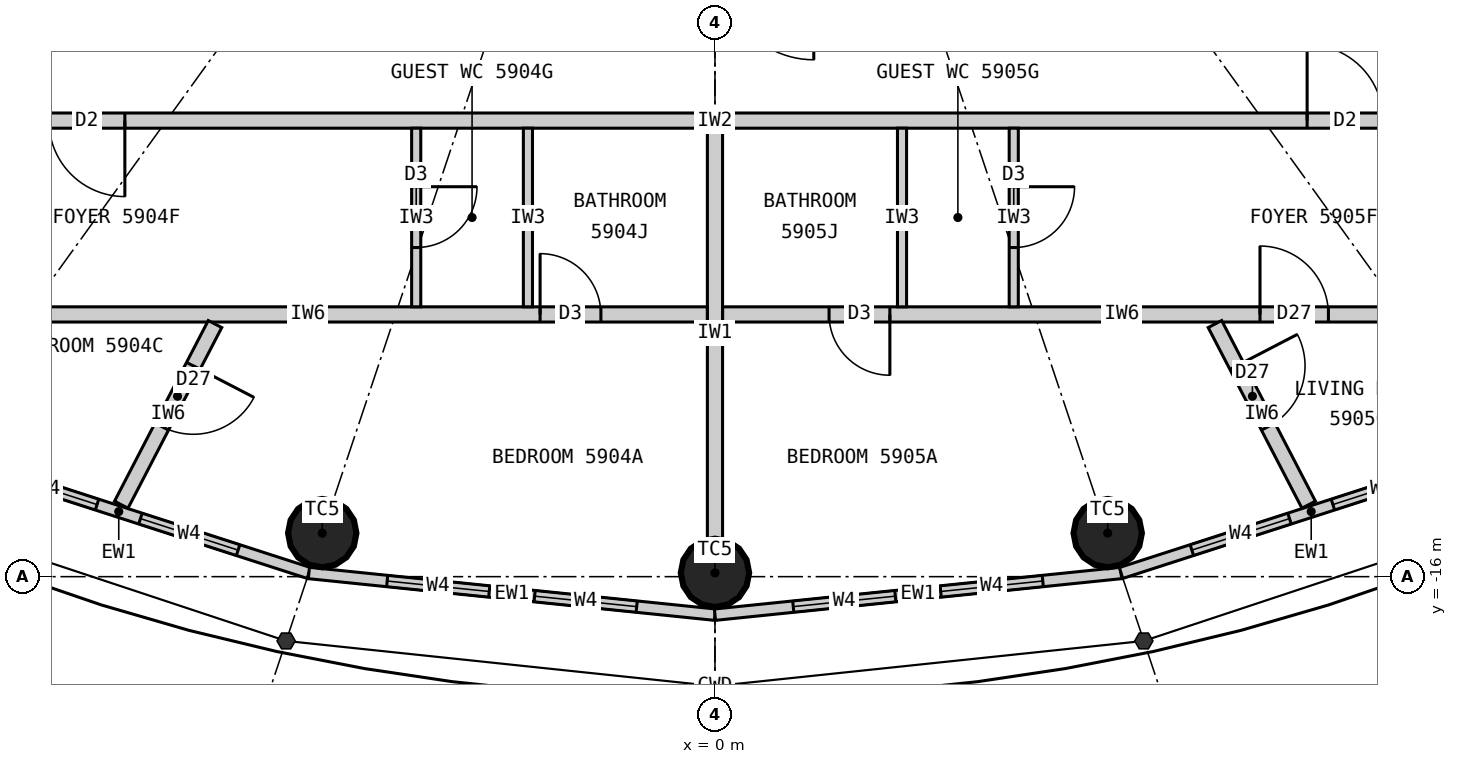
"""IFC4 building model, lengths in metres.
Left out: names, types, materials, properties, quantities, classifications, styles, units other than length and angle.
Written with IfcOpenShell. Run it as: python <this file> out.ifc"""

import sys

from ifc_helpers import new_model, si_unit, direction, frame, frame_2d, origin, origin_2d, place, context, subcontext, project, spatial, rectangle, circle, extrude, element, fill, save


model = new_model("IFC4")
c1 = context("Model", 3, precision=1e-05, world=origin(), true_north=direction((0.0, 1.0)))
c2 = subcontext(c1, "Body", "Model", "MODEL_VIEW")
j1 = project(units=[si_unit("LENGTHUNIT", "METRE"), si_unit("PLANEANGLEUNIT", "RADIAN")], contexts=[c1])
p1 = place(None, origin())
s1 = spatial("IfcSite", under=j1, at=p1, CompositionType="ELEMENT")
p2 = place(p1, origin())
s2 = spatial("IfcBuilding", under=s1, at=p2, CompositionType="ELEMENT")
p3 = place(p2, frame((0.0, 0.0, 219.3)))
s3 = spatial("IfcBuildingStorey", under=s2, at=p3, CompositionType="ELEMENT", Elevation=219.3)
for number, where, z_axis, x_axis in (
    (1, (-5.167, -15.427, 0.0), (0.0, 0.0, 1.0), (1.0, 0.0, 0.0)),
    (2, (0.0, -15.95, 0.0), (0.0, 0.0, 1.0), (1.0, 0.0, 0.0)),
    (3, (5.167, -15.427, 0.0), (0.0, 0.0, 1.0), (1.0, 0.0, 0.0)),
):
    element("IfcColumn", number, at=place(p3, frame(where, z_axis=z_axis, x_axis=x_axis)), inside=s3, PredefinedType="COLUMN", context=c2, shape_type="SweptSolid", body=[
        extrude(circle(Radius=0.45, at=origin_2d()), origin(), (0.0, 0.0, 1.0), 3.3),
    ])
p4 = place(p3, frame((-10.346, -14.336, 0.0), z_axis=(0.0, 0.0, 1.0), x_axis=(0.951644702515, -0.307200846638, 0.0)))
e4 = element("IfcWall", 4, at=p4, inside=s3, PredefinedType="ELEMENTEDWALL", context=c2, shape_type="SweptSolid", body=[
    extrude(rectangle(XDim=5.258, YDim=0.15, at=frame_2d((2.629, 0.0))), origin(), (0.0, 0.0, 1.0), 3.12),
])
p5 = place(p4, frame((0.979, 0.0, 0.9)))
e5 = element("IfcOpeningElement", 5, at=p5, cuts=e4, PredefinedType="OPENING", context=c2, shape_type="SweptSolid", body=[
    extrude(rectangle(XDim=1.35, YDim=1.9, at=frame_2d((0.675, 0.95))), frame((0.0, 0.085, 0.0), z_axis=(0.0, -1.0, 0.0), x_axis=(1.0, 0.0, 0.0)), (0.0, 0.0, 1.0), 0.17),
])
p6 = place(p4, frame((2.929, 0.0, 0.9)))
e6 = element("IfcOpeningElement", 6, at=p6, cuts=e4, PredefinedType="OPENING", context=c2, shape_type="SweptSolid", body=[
    extrude(rectangle(XDim=1.35, YDim=1.9, at=frame_2d((0.675, 0.95))), frame((0.0, 0.085, 0.0), z_axis=(0.0, -1.0, 0.0), x_axis=(1.0, 0.0, 0.0)), (0.0, 0.0, 1.0), 0.17),
])
p7 = place(p3, frame((-5.343, -15.952, 0.0), z_axis=(0.0, 0.0, 1.0), x_axis=(0.994774574972, -0.102095763818, 0.0)))
e7 = element("IfcWall", 7, at=p7, inside=s3, PredefinedType="ELEMENTEDWALL", context=c2, shape_type="SweptSolid", body=[
    extrude(rectangle(XDim=5.371, YDim=0.15, at=frame_2d((2.686, 0.0))), origin(), (0.0, 0.0, 1.0), 3.12),
])
p8 = place(p7, frame((1.035, 0.0, 0.9)))
e8 = element("IfcOpeningElement", 8, at=p8, cuts=e7, PredefinedType="OPENING", context=c2, shape_type="SweptSolid", body=[
    extrude(rectangle(XDim=1.35, YDim=1.9, at=frame_2d((0.675, 0.95))), frame((0.0, 0.085, 0.0), z_axis=(0.0, -1.0, 0.0), x_axis=(1.0, 0.0, 0.0)), (0.0, 0.0, 1.0), 0.17),
])
p9 = place(p7, frame((2.985, 0.0, 0.9)))
e9 = element("IfcOpeningElement", 9, at=p9, cuts=e7, PredefinedType="OPENING", context=c2, shape_type="SweptSolid", body=[
    extrude(rectangle(XDim=1.35, YDim=1.9, at=frame_2d((0.675, 0.95))), frame((0.0, 0.085, 0.0), z_axis=(0.0, -1.0, 0.0), x_axis=(1.0, 0.0, 0.0)), (0.0, 0.0, 1.0), 0.17),
])
p10 = place(p3, frame((0.0, -16.5, 0.0), z_axis=(0.0, 0.0, 1.0), x_axis=(0.994774574972, 0.102095763818, 0.0)))
e10 = element("IfcWall", 10, at=p10, inside=s3, PredefinedType="ELEMENTEDWALL", context=c2, shape_type="SweptSolid", body=[
    extrude(rectangle(XDim=5.371, YDim=0.15, at=frame_2d((2.686, 0.0))), origin(), (0.0, 0.0, 1.0), 3.12),
])
p11 = place(p10, frame((1.035, 0.0, 0.9)))
e11 = element("IfcOpeningElement", 11, at=p11, cuts=e10, PredefinedType="OPENING", context=c2, shape_type="SweptSolid", body=[
    extrude(rectangle(XDim=1.35, YDim=1.9, at=frame_2d((0.675, 0.95))), frame((0.0, 0.085, 0.0), z_axis=(0.0, -1.0, 0.0), x_axis=(1.0, 0.0, 0.0)), (0.0, 0.0, 1.0), 0.17),
])
p12 = place(p10, frame((2.985, 0.0, 0.9)))
e12 = element("IfcOpeningElement", 12, at=p12, cuts=e10, PredefinedType="OPENING", context=c2, shape_type="SweptSolid", body=[
    extrude(rectangle(XDim=1.35, YDim=1.9, at=frame_2d((0.675, 0.95))), frame((0.0, 0.085, 0.0), z_axis=(0.0, -1.0, 0.0), x_axis=(1.0, 0.0, 0.0)), (0.0, 0.0, 1.0), 0.17),
])
p13 = place(p3, frame((5.343, -15.952, 0.0), z_axis=(0.0, 0.0, 1.0), x_axis=(0.951644702515, 0.307200846638, 0.0)))
e13 = element("IfcWall", 13, at=p13, inside=s3, PredefinedType="ELEMENTEDWALL", context=c2, shape_type="SweptSolid", body=[
    extrude(rectangle(XDim=5.258, YDim=0.15, at=frame_2d((2.629, 0.0))), origin(), (0.0, 0.0, 1.0), 3.12),
])
p14 = place(p13, frame((0.979, 0.0, 0.9)))
e14 = element("IfcOpeningElement", 14, at=p14, cuts=e13, PredefinedType="OPENING", context=c2, shape_type="SweptSolid", body=[
    extrude(rectangle(XDim=1.35, YDim=1.9, at=frame_2d((0.675, 0.95))), frame((0.0, 0.085, 0.0), z_axis=(0.0, -1.0, 0.0), x_axis=(1.0, 0.0, 0.0)), (0.0, 0.0, 1.0), 0.17),
])
p15 = place(p13, frame((2.929, 0.0, 0.9)))
e15 = element("IfcOpeningElement", 15, at=p15, cuts=e13, PredefinedType="OPENING", context=c2, shape_type="SweptSolid", body=[
    extrude(rectangle(XDim=1.35, YDim=1.9, at=frame_2d((0.675, 0.95))), frame((0.0, 0.085, 0.0), z_axis=(0.0, -1.0, 0.0), x_axis=(1.0, 0.0, 0.0)), (0.0, 0.0, 1.0), 0.17),
])
p16 = place(p3, frame((11.1, -10.0, 0.0), z_axis=(0.0, 0.0, 1.0), x_axis=(-1.0, 0.0, 0.0)))
e16 = element("IfcWall", 16, at=p16, inside=s3, PredefinedType="PARTITIONING", context=c2, shape_type="SweptSolid", body=[
    extrude(rectangle(XDim=22.2, YDim=0.2, at=frame_2d((11.1, 0.0))), origin(), (0.0, 0.0, 1.0), 3.12),
])
p17 = place(p16, frame((18.864, 0.0, 0.0)))
e17 = element("IfcOpeningElement", 17, at=p17, cuts=e16, PredefinedType="OPENING", context=c2, shape_type="SweptSolid", body=[
    extrude(rectangle(XDim=1.0, YDim=2.2, at=frame_2d((0.5, 1.1))), frame((0.0, 0.11, 0.0), z_axis=(0.0, -1.0, 0.0), x_axis=(1.0, 0.0, 0.0)), (0.0, 0.0, 1.0), 0.22),
])
p18 = place(p16, frame((2.309, 0.0, 0.0)))
e18 = element("IfcOpeningElement", 18, at=p18, cuts=e16, PredefinedType="OPENING", context=c2, shape_type="SweptSolid", body=[
    extrude(rectangle(XDim=1.0, YDim=2.2, at=frame_2d((0.5, 1.1))), frame((0.0, 0.11, 0.0), z_axis=(0.0, -1.0, 0.0), x_axis=(1.0, 0.0, 0.0)), (0.0, 0.0, 1.0), 0.22),
])
p19 = place(p3, frame((0.0, -10.1, 0.0), z_axis=(0.0, 0.0, 1.0), x_axis=(0.0, -1.0, 0.0)))
e19 = element("IfcWall", 19, at=p19, inside=s3, PredefinedType="PARTITIONING", context=c2, shape_type="SweptSolid", body=[
    extrude(rectangle(XDim=5.4, YDim=0.2, at=frame_2d((2.7, 0.0))), origin(), (0.0, 0.0, 1.0), 2.42),
])
p20 = place(p3, frame((-10.609, -12.55, 0.0), z_axis=(0.0, 0.0, 1.0), x_axis=(1.0, 0.0, 0.0)))
e20 = element("IfcWall", 20, at=p20, inside=s3, PredefinedType="PARTITIONING", context=c2, shape_type="SweptSolid", body=[
    extrude(rectangle(XDim=10.508, YDim=0.2, at=frame_2d((5.254, 0.0))), origin(), (0.0, 0.0, 1.0), 3.12),
])
p21 = place(p20, frame((8.308, 0.0, 0.0)))
e21 = element("IfcOpeningElement", 21, at=p21, cuts=e20, PredefinedType="OPENING", context=c2, shape_type="SweptSolid", body=[
    extrude(rectangle(XDim=0.8, YDim=2.1, at=frame_2d((0.4, 1.05))), frame((0.0, 0.11, 0.0), z_axis=(0.0, -1.0, 0.0), x_axis=(1.0, 0.0, 0.0)), (0.0, 0.0, 1.0), 0.22),
])
p22 = place(p3, frame((-6.578, -12.677, 0.0), z_axis=(0.0, 0.0, 1.0), x_axis=(-0.460620531465, -0.887597164255, 0.0)))
e22 = element("IfcWall", 22, at=p22, inside=s3, PredefinedType="PARTITIONING", context=c2, shape_type="SweptSolid", body=[
    extrude(rectangle(XDim=2.678, YDim=0.2, at=frame_2d((1.339, 0.0))), origin(), (0.0, 0.0, 1.0), 3.12),
])
p23 = place(p22, frame((0.62, 0.0, 0.0)))
e23 = element("IfcOpeningElement", 23, at=p23, cuts=e22, PredefinedType="OPENING", context=c2, shape_type="SweptSolid", body=[
    extrude(rectangle(XDim=0.9, YDim=2.1, at=frame_2d((0.45, 1.05))), frame((0.0, 0.11, 0.0), z_axis=(0.0, -1.0, 0.0), x_axis=(1.0, 0.0, 0.0)), (0.0, 0.0, 1.0), 0.22),
])
p24 = place(p3, frame((-3.931, -10.1, 0.0), z_axis=(0.0, 0.0, 1.0), x_axis=(0.0, -1.0, 0.0)))
e24 = element("IfcWall", 24, at=p24, inside=s3, PredefinedType="PARTITIONING", context=c2, shape_type="SweptSolid", body=[
    extrude(rectangle(XDim=2.35, YDim=0.12, at=frame_2d((1.175, 0.0))), origin(), (0.0, 0.0, 1.0), 3.12),
])
p25 = place(p24, frame((0.77, 0.0, 0.0)))
e25 = element("IfcOpeningElement", 25, at=p25, cuts=e24, PredefinedType="OPENING", context=c2, shape_type="SweptSolid", body=[
    extrude(rectangle(XDim=0.8, YDim=2.1, at=frame_2d((0.4, 1.05))), frame((0.0, 0.07, 0.0), z_axis=(0.0, -1.0, 0.0), x_axis=(1.0, 0.0, 0.0)), (0.0, 0.0, 1.0), 0.14),
])
p26 = place(p3, frame((-2.461, -10.1, 0.0), z_axis=(0.0, 0.0, 1.0), x_axis=(0.0, -1.0, 0.0)))
e26 = element("IfcWall", 26, at=p26, inside=s3, PredefinedType="PARTITIONING", context=c2, shape_type="SweptSolid", body=[
    extrude(rectangle(XDim=2.35, YDim=0.12, at=frame_2d((1.175, 0.0))), origin(), (0.0, 0.0, 1.0), 3.12),
])
p27 = place(p3, frame((0.101, -12.55, 0.0), z_axis=(0.0, 0.0, 1.0), x_axis=(1.0, 0.0, 0.0)))
e27 = element("IfcWall", 27, at=p27, inside=s3, PredefinedType="PARTITIONING", context=c2, shape_type="SweptSolid", body=[
    extrude(rectangle(XDim=10.508, YDim=0.2, at=frame_2d((5.254, 0.0))), origin(), (0.0, 0.0, 1.0), 3.12),
])
p28 = place(p27, frame((1.4, 0.0, 0.0)))
e28 = element("IfcOpeningElement", 28, at=p28, cuts=e27, PredefinedType="OPENING", context=c2, shape_type="SweptSolid", body=[
    extrude(rectangle(XDim=0.8, YDim=2.1, at=frame_2d((0.4, 1.05))), frame((0.0, 0.11, 0.0), z_axis=(0.0, -1.0, 0.0), x_axis=(1.0, 0.0, 0.0)), (0.0, 0.0, 1.0), 0.22),
])
p29 = place(p27, frame((7.07, 0.0, 0.0)))
e29 = element("IfcOpeningElement", 29, at=p29, cuts=e27, PredefinedType="OPENING", context=c2, shape_type="SweptSolid", body=[
    extrude(rectangle(XDim=0.9, YDim=2.1, at=frame_2d((0.45, 1.05))), frame((0.0, 0.11, 0.0), z_axis=(0.0, -1.0, 0.0), x_axis=(1.0, 0.0, 0.0)), (0.0, 0.0, 1.0), 0.22),
])
p30 = place(p3, frame((6.578, -12.677, 0.0), z_axis=(0.0, 0.0, 1.0), x_axis=(0.460620531465, -0.887597164255, 0.0)))
e30 = element("IfcWall", 30, at=p30, inside=s3, PredefinedType="PARTITIONING", context=c2, shape_type="SweptSolid", body=[
    extrude(rectangle(XDim=2.678, YDim=0.2, at=frame_2d((1.339, 0.0))), origin(), (0.0, 0.0, 1.0), 3.12),
])
p31 = place(p30, frame((0.62, 0.0, 0.0)))
e31 = element("IfcOpeningElement", 31, at=p31, cuts=e30, PredefinedType="OPENING", context=c2, shape_type="SweptSolid", body=[
    extrude(rectangle(XDim=0.9, YDim=2.1, at=frame_2d((0.45, 1.05))), frame((0.0, 0.11, 0.0), z_axis=(0.0, -1.0, 0.0), x_axis=(1.0, 0.0, 0.0)), (0.0, 0.0, 1.0), 0.22),
])
p32 = place(p3, frame((2.461, -10.1, 0.0), z_axis=(0.0, 0.0, 1.0), x_axis=(0.0, -1.0, 0.0)))
e32 = element("IfcWall", 32, at=p32, inside=s3, PredefinedType="PARTITIONING", context=c2, shape_type="SweptSolid", body=[
    extrude(rectangle(XDim=2.35, YDim=0.12, at=frame_2d((1.175, 0.0))), origin(), (0.0, 0.0, 1.0), 3.12),
])
p33 = place(p3, frame((3.931, -10.1, 0.0), z_axis=(0.0, 0.0, 1.0), x_axis=(0.0, -1.0, 0.0)))
e33 = element("IfcWall", 33, at=p33, inside=s3, PredefinedType="PARTITIONING", context=c2, shape_type="SweptSolid", body=[
    extrude(rectangle(XDim=2.35, YDim=0.12, at=frame_2d((1.175, 0.0))), origin(), (0.0, 0.0, 1.0), 3.12),
])
p34 = place(p33, frame((0.77, 0.0, 0.0)))
e34 = element("IfcOpeningElement", 34, at=p34, cuts=e33, PredefinedType="OPENING", context=c2, shape_type="SweptSolid", body=[
    extrude(rectangle(XDim=0.8, YDim=2.1, at=frame_2d((0.4, 1.05))), frame((0.0, 0.07, 0.0), z_axis=(0.0, -1.0, 0.0), x_axis=(1.0, 0.0, 0.0)), (0.0, 0.0, 1.0), 0.14),
])
p35 = place(p5, origin())
e35 = element("IfcWindow", 35, at=p35, inside=s3, PartitioningType="SINGLE_PANEL", PredefinedType="WINDOW", context=c2, shape_type="SweptSolid", body=[
    extrude(rectangle(XDim=1.35, YDim=1.9, at=frame_2d((0.675, 0.95))), frame((0.0, 0.03, 0.0), z_axis=(0.0, -1.0, 0.0), x_axis=(1.0, 0.0, 0.0)), (0.0, 0.0, 1.0), 0.06),
])
fill(e5, e35)
p36 = place(p6, origin())
e36 = element("IfcWindow", 36, at=p36, inside=s3, PartitioningType="SINGLE_PANEL", PredefinedType="WINDOW", context=c2, shape_type="SweptSolid", body=[
    extrude(rectangle(XDim=1.35, YDim=1.9, at=frame_2d((0.675, 0.95))), frame((0.0, 0.03, 0.0), z_axis=(0.0, -1.0, 0.0), x_axis=(1.0, 0.0, 0.0)), (0.0, 0.0, 1.0), 0.06),
])
fill(e6, e36)
p37 = place(p8, origin())
e37 = element("IfcWindow", 37, at=p37, inside=s3, PartitioningType="SINGLE_PANEL", PredefinedType="WINDOW", context=c2, shape_type="SweptSolid", body=[
    extrude(rectangle(XDim=1.35, YDim=1.9, at=frame_2d((0.675, 0.95))), frame((0.0, 0.03, 0.0), z_axis=(0.0, -1.0, 0.0), x_axis=(1.0, 0.0, 0.0)), (0.0, 0.0, 1.0), 0.06),
])
fill(e8, e37)
p38 = place(p9, origin())
e38 = element("IfcWindow", 38, at=p38, inside=s3, PartitioningType="SINGLE_PANEL", PredefinedType="WINDOW", context=c2, shape_type="SweptSolid", body=[
    extrude(rectangle(XDim=1.35, YDim=1.9, at=frame_2d((0.675, 0.95))), frame((0.0, 0.03, 0.0), z_axis=(0.0, -1.0, 0.0), x_axis=(1.0, 0.0, 0.0)), (0.0, 0.0, 1.0), 0.06),
])
fill(e9, e38)
p39 = place(p11, origin())
e39 = element("IfcWindow", 39, at=p39, inside=s3, PartitioningType="SINGLE_PANEL", PredefinedType="WINDOW", context=c2, shape_type="SweptSolid", body=[
    extrude(rectangle(XDim=1.35, YDim=1.9, at=frame_2d((0.675, 0.95))), frame((0.0, 0.03, 0.0), z_axis=(0.0, -1.0, 0.0), x_axis=(1.0, 0.0, 0.0)), (0.0, 0.0, 1.0), 0.06),
])
fill(e11, e39)
p40 = place(p12, origin())
e40 = element("IfcWindow", 40, at=p40, inside=s3, PartitioningType="SINGLE_PANEL", PredefinedType="WINDOW", context=c2, shape_type="SweptSolid", body=[
    extrude(rectangle(XDim=1.35, YDim=1.9, at=frame_2d((0.675, 0.95))), frame((0.0, 0.03, 0.0), z_axis=(0.0, -1.0, 0.0), x_axis=(1.0, 0.0, 0.0)), (0.0, 0.0, 1.0), 0.06),
])
fill(e12, e40)
p41 = place(p14, origin())
e41 = element("IfcWindow", 41, at=p41, inside=s3, PartitioningType="SINGLE_PANEL", PredefinedType="WINDOW", context=c2, shape_type="SweptSolid", body=[
    extrude(rectangle(XDim=1.35, YDim=1.9, at=frame_2d((0.675, 0.95))), frame((0.0, 0.03, 0.0), z_axis=(0.0, -1.0, 0.0), x_axis=(1.0, 0.0, 0.0)), (0.0, 0.0, 1.0), 0.06),
])
fill(e14, e41)
p42 = place(p15, origin())
e42 = element("IfcWindow", 42, at=p42, inside=s3, PartitioningType="SINGLE_PANEL", PredefinedType="WINDOW", context=c2, shape_type="SweptSolid", body=[
    extrude(rectangle(XDim=1.35, YDim=1.9, at=frame_2d((0.675, 0.95))), frame((0.0, 0.03, 0.0), z_axis=(0.0, -1.0, 0.0), x_axis=(1.0, 0.0, 0.0)), (0.0, 0.0, 1.0), 0.06),
])
fill(e15, e42)
p43 = place(p17, origin())
e43 = element("IfcDoor", 43, at=p43, inside=s3, OperationType="SINGLE_SWING_LEFT", PredefinedType="DOOR", context=c2, shape_type="SweptSolid", body=[
    extrude(rectangle(XDim=1.0, YDim=2.2, at=frame_2d((0.5, 1.1))), frame((0.0, 0.025, 0.0), z_axis=(0.0, -1.0, 0.0), x_axis=(1.0, 0.0, 0.0)), (0.0, 0.0, 1.0), 0.05),
])
fill(e17, e43)
p44 = place(p25, origin())
e44 = element("IfcDoor", 44, at=p44, inside=s3, OperationType="SINGLE_SWING_LEFT", PredefinedType="DOOR", context=c2, shape_type="SweptSolid", body=[
    extrude(rectangle(XDim=0.8, YDim=2.1, at=frame_2d((0.4, 1.05))), frame((0.0, 0.025, 0.0), z_axis=(0.0, -1.0, 0.0), x_axis=(1.0, 0.0, 0.0)), (0.0, 0.0, 1.0), 0.05),
])
fill(e25, e44)
p45 = place(p21, origin())
e45 = element("IfcDoor", 45, at=p45, inside=s3, OperationType="SINGLE_SWING_LEFT", PredefinedType="DOOR", context=c2, shape_type="SweptSolid", body=[
    extrude(rectangle(XDim=0.8, YDim=2.1, at=frame_2d((0.4, 1.05))), frame((0.0, 0.025, 0.0), z_axis=(0.0, -1.0, 0.0), x_axis=(1.0, 0.0, 0.0)), (0.0, 0.0, 1.0), 0.05),
])
fill(e21, e45)
p46 = place(p23, origin())
e46 = element("IfcDoor", 46, at=p46, inside=s3, OperationType="SINGLE_SWING_LEFT", PredefinedType="DOOR", context=c2, shape_type="SweptSolid", body=[
    extrude(rectangle(XDim=0.9, YDim=2.1, at=frame_2d((0.45, 1.05))), frame((0.0, 0.025, 0.0), z_axis=(0.0, -1.0, 0.0), x_axis=(1.0, 0.0, 0.0)), (0.0, 0.0, 1.0), 0.05),
])
fill(e23, e46)
p47 = place(p18, origin())
e47 = element("IfcDoor", 47, at=p47, inside=s3, OperationType="SINGLE_SWING_RIGHT", PredefinedType="DOOR", context=c2, shape_type="SweptSolid", body=[
    extrude(rectangle(XDim=1.0, YDim=2.2, at=frame_2d((0.5, 1.1))), frame((0.0, 0.025, 0.0), z_axis=(0.0, -1.0, 0.0), x_axis=(1.0, 0.0, 0.0)), (0.0, 0.0, 1.0), 0.05),
])
fill(e18, e47)
p48 = place(p28, origin())
e48 = element("IfcDoor", 48, at=p48, inside=s3, OperationType="SINGLE_SWING_RIGHT", PredefinedType="DOOR", context=c2, shape_type="SweptSolid", body=[
    extrude(rectangle(XDim=0.8, YDim=2.1, at=frame_2d((0.4, 1.05))), frame((0.0, 0.025, 0.0), z_axis=(0.0, -1.0, 0.0), x_axis=(1.0, 0.0, 0.0)), (0.0, 0.0, 1.0), 0.05),
])
fill(e28, e48)
p49 = place(p34, origin())
e49 = element("IfcDoor", 49, at=p49, inside=s3, OperationType="SINGLE_SWING_LEFT", PredefinedType="DOOR", context=c2, shape_type="SweptSolid", body=[
    extrude(rectangle(XDim=0.8, YDim=2.1, at=frame_2d((0.4, 1.05))), frame((0.0, 0.025, 0.0), z_axis=(0.0, -1.0, 0.0), x_axis=(1.0, 0.0, 0.0)), (0.0, 0.0, 1.0), 0.05),
])
fill(e34, e49)
p50 = place(p29, origin())
e50 = element("IfcDoor", 50, at=p50, inside=s3, OperationType="SINGLE_SWING_LEFT", PredefinedType="DOOR", context=c2, shape_type="SweptSolid", body=[
    extrude(rectangle(XDim=0.9, YDim=2.1, at=frame_2d((0.45, 1.05))), frame((0.0, 0.025, 0.0), z_axis=(0.0, -1.0, 0.0), x_axis=(1.0, 0.0, 0.0)), (0.0, 0.0, 1.0), 0.05),
])
fill(e29, e50)
p51 = place(p31, origin())
e51 = element("IfcDoor", 51, at=p51, inside=s3, OperationType="SINGLE_SWING_LEFT", PredefinedType="DOOR", context=c2, shape_type="SweptSolid", body=[
    extrude(rectangle(XDim=0.9, YDim=2.1, at=frame_2d((0.45, 1.05))), frame((0.0, 0.025, 0.0), z_axis=(0.0, -1.0, 0.0), x_axis=(1.0, 0.0, 0.0)), (0.0, 0.0, 1.0), 0.05),
])
fill(e31, e51)
save(model, sys.argv[1])
